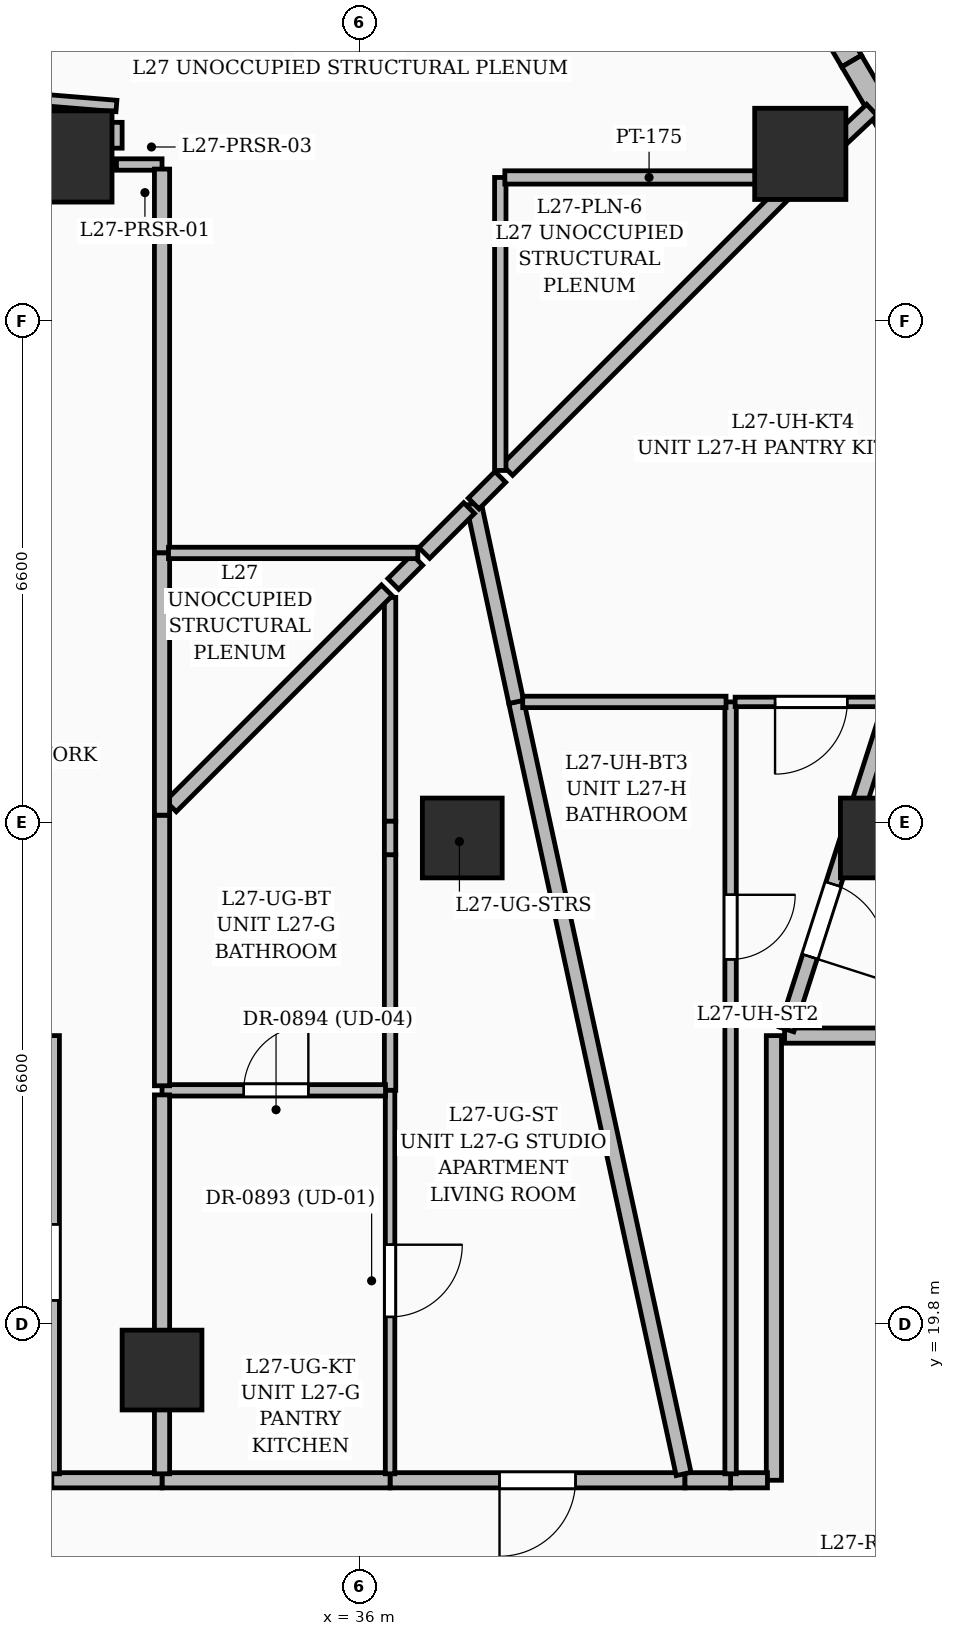
"""IFC4 building model, lengths in metres.
Left out: names, types, materials, properties, quantities, classifications, styles, units other than length and angle.
Written with IfcOpenShell. Run it as: python <this file> out.ifc"""

import sys

from ifc_helpers import new_model, si_unit, direction, frame, frame_2d, origin, origin_2d, place, context, subcontext, project, spatial, rectangle, extrude, element, fill, save


model = new_model("IFC4")
c1 = context("Model", 3, precision=1e-05, world=origin(), true_north=direction((0.0, 1.0)))
c2 = subcontext(c1, "Body", "Model", "MODEL_VIEW")
j1 = project(units=[si_unit("LENGTHUNIT", "METRE"), si_unit("PLANEANGLEUNIT", "RADIAN")], contexts=[c1])
p1 = place(None, origin())
s1 = spatial("IfcSite", under=j1, at=p1, CompositionType="ELEMENT")
p2 = place(p1, origin())
s2 = spatial("IfcBuilding", under=s1, at=p2, CompositionType="ELEMENT")
p3 = place(p2, frame((0.0, 0.0, 110.4)))
s3 = spatial("IfcBuildingStorey", under=s2, at=p3, CompositionType="ELEMENT", Elevation=110.4)
for number, where, z_axis, x_axis in (
    (1, (42.85, 26.2, 0.0), (0.0, 0.0, 1.0), (1.0, 0.0, 0.0)),
    (2, (37.35, 26.2, 0.0), (0.0, 0.0, 1.0), (1.0, 0.0, 0.0)),
    (3, (33.4, 19.2, 0.0), (0.0, 0.0, 1.0), (1.0, 0.0, 0.0)),
):
    element("IfcColumn", number, at=place(p3, frame(where, z_axis=z_axis, x_axis=x_axis)), inside=s3, PredefinedType="COLUMN", context=c2, shape_type="SweptSolid", body=[
        extrude(rectangle(XDim=1.05, YDim=1.05, at=origin_2d()), origin(), (0.0, 0.0, 1.0), 3.6),
    ])
for number, where, z_axis, x_axis in (
    (4, (41.797, 35.2, 0.0), (0.0, 0.0, 1.0), (1.0, 0.0, 0.0)),
    (5, (32.142, 35.166, 0.0), (0.0, 0.0, 1.0), (1.0, 0.0, 0.0)),
):
    element("IfcColumn", number, at=place(p3, frame(where, z_axis=z_axis, x_axis=x_axis)), inside=s3, PredefinedType="COLUMN", context=c2, shape_type="SweptSolid", body=[
        extrude(rectangle(XDim=1.2, YDim=1.2, at=origin_2d()), origin(), (0.0, 0.0, 1.0), 3.6),
    ])
p4 = place(p3, frame((31.513, 36.415, 0.0), z_axis=(0.0, 0.0, 1.0), x_axis=(0.534892719091, 0.844919983823, 0.0)))
e6 = element("IfcWall", 6, at=p4, inside=s3, PredefinedType="SOLIDWALL", context=c2, shape_type="SweptSolid", body=[
    extrude(rectangle(XDim=6.634, YDim=0.3, at=frame_2d((3.317, 0.0))), origin(), (0.0, 0.0, 1.0), 3.35),
])
p5 = place(p4, frame((0.6, 0.0, 0.55)))
e7 = element("IfcOpeningElement", 7, at=p5, cuts=e6, PredefinedType="OPENING", context=c2, shape_type="SweptSolid", body=[
    extrude(rectangle(XDim=1.6, YDim=2.2, at=frame_2d((0.8, 1.1))), frame((0.0, 0.16, 0.0), z_axis=(0.0, -1.0, 0.0), x_axis=(1.0, 0.0, 0.0)), (0.0, 0.0, 1.0), 0.32),
])
p6 = place(p4, frame((3.35, 0.0, 0.55)))
e8 = element("IfcOpeningElement", 8, at=p6, cuts=e6, PredefinedType="OPENING", context=c2, shape_type="SweptSolid", body=[
    extrude(rectangle(XDim=1.6, YDim=2.2, at=frame_2d((0.8, 1.1))), frame((0.0, 0.16, 0.0), z_axis=(0.0, -1.0, 0.0), x_axis=(1.0, 0.0, 0.0)), (0.0, 0.0, 1.0), 0.32),
])
p7 = place(p3, frame((39.443, 41.58, 0.0), z_axis=(0.0, 0.0, 1.0), x_axis=(0.506342397937, -0.862332520581, 0.0)))
e9 = element("IfcWall", 9, at=p7, inside=s3, PredefinedType="SOLIDWALL", context=c2, shape_type="SweptSolid", body=[
    extrude(rectangle(XDim=5.984, YDim=0.3, at=frame_2d((2.992, 0.0))), origin(), (0.0, 0.0, 1.0), 3.35),
])
p8 = place(p7, frame((2.13, 0.0, 0.6)))
e10 = element("IfcOpeningElement", 10, at=p8, cuts=e9, PredefinedType="OPENING", context=c2, shape_type="SweptSolid", body=[
    extrude(rectangle(XDim=2.4, YDim=2.1, at=frame_2d((1.2, 1.05))), frame((0.0, 0.16, 0.0), z_axis=(0.0, -1.0, 0.0), x_axis=(1.0, 0.0, 0.0)), (0.0, 0.0, 1.0), 0.32),
])
p9 = place(p3, frame((42.472, 36.42, 0.0), z_axis=(0.0, 0.0, 1.0), x_axis=(0.506315009763, -0.86234860172, 0.0)))
e11 = element("IfcWall", 11, at=p9, inside=s3, PredefinedType="SOLIDWALL", context=c2, shape_type="SweptSolid", body=[
    extrude(rectangle(XDim=6.553, YDim=0.3, at=frame_2d((3.277, 0.0))), origin(), (0.0, 0.0, 1.0), 3.35),
])
p10 = place(p9, frame((1.725, 0.0, 0.55)))
e12 = element("IfcOpeningElement", 12, at=p10, cuts=e11, PredefinedType="OPENING", context=c2, shape_type="SweptSolid", body=[
    extrude(rectangle(XDim=2.1, YDim=2.4, at=frame_2d((1.05, 1.2))), frame((0.0, 0.16, 0.0), z_axis=(0.0, -1.0, 0.0), x_axis=(1.0, 0.0, 0.0)), (0.0, 0.0, 1.0), 0.32),
])
p11 = place(p3, frame((40.28, 17.75, 0.0), z_axis=(0.0, 0.0, 1.0), x_axis=(-1.0, 0.0, 0.0)))
e13 = element("IfcWall", 13, at=p11, inside=s3, PredefinedType="PARTITIONING", context=c2, shape_type="SweptSolid", body=[
    extrude(rectangle(XDim=3.88, YDim=0.2, at=frame_2d((1.94, 0.0))), origin(), (0.0, 0.0, 1.0), 3.35),
])
p12 = place(p11, frame((1.44, 0.0, 0.0)))
e14 = element("IfcOpeningElement", 14, at=p12, cuts=e13, PredefinedType="OPENING", context=c2, shape_type="SweptSolid", body=[
    extrude(rectangle(XDim=1.0, YDim=2.2, at=frame_2d((0.5, 1.1))), frame((0.0, 0.11, 0.0), z_axis=(0.0, -1.0, 0.0), x_axis=(1.0, 0.0, 0.0)), (0.0, 0.0, 1.0), 0.22),
])
p13 = place(p3, frame((36.4, 17.75, 0.0), z_axis=(0.0, 0.0, 1.0), x_axis=(-1.0, 0.0, 0.0)))
e15 = element("IfcWall", 15, at=p13, inside=s3, PredefinedType="PARTITIONING", context=c2, shape_type="SweptSolid", body=[
    extrude(rectangle(XDim=3.0, YDim=0.2, at=frame_2d((1.5, 0.0))), origin(), (0.0, 0.0, 1.0), 2.436),
])
p14 = place(p3, frame((43.915, 23.6, 0.0), z_axis=(0.0, 0.0, 1.0), x_axis=(-1.0, 0.0, 0.0)))
e16 = element("IfcWall", 16, at=p14, inside=s3, PredefinedType="PARTITIONING", context=c2, shape_type="SweptSolid", body=[
    extrude(rectangle(XDim=2.325, YDim=0.2, at=frame_2d((1.163, 0.0))), origin(), (0.0, 0.0, 1.0), 2.436),
])
p15 = place(p3, frame((33.4, 17.75, 0.0), z_axis=(0.0, 0.0, 1.0), x_axis=(-1.0, 0.0, 0.0)))
e17 = element("IfcWall", 17, at=p15, inside=s3, PredefinedType="PARTITIONING", context=c2, shape_type="SweptSolid", body=[
    extrude(rectangle(XDim=1.45, YDim=0.2, at=frame_2d((0.725, 0.0))), origin(), (0.0, 0.0, 1.0), 3.35),
])
p16 = place(p3, frame((31.95, 17.835, 0.0), z_axis=(0.0, 0.0, 1.0), x_axis=(0.0, 1.0, 0.0)))
e18 = element("IfcWall", 18, at=p16, inside=s3, PredefinedType="PARTITIONING", context=c2, shape_type="SweptSolid", body=[
    extrude(rectangle(XDim=5.765, YDim=0.2, at=frame_2d((2.883, 0.0))), origin(), (0.0, 0.0, 1.0), 2.372),
])
p17 = place(p16, frame((2.281, 0.0, 0.0)))
e19 = element("IfcOpeningElement", 19, at=p17, cuts=e18, PredefinedType="OPENING", context=c2, shape_type="SweptSolid", body=[
    extrude(rectangle(XDim=1.0, YDim=2.2, at=frame_2d((0.5, 1.1))), frame((0.0, 0.11, 0.0), z_axis=(0.0, -1.0, 0.0), x_axis=(1.0, 0.0, 0.0)), (0.0, 0.0, 1.0), 0.22),
])
p18 = place(p3, frame((41.45, 23.6, 0.0), z_axis=(0.0, 0.0, 1.0), x_axis=(0.0, -1.0, 0.0)))
e20 = element("IfcWall", 20, at=p18, inside=s3, PredefinedType="PARTITIONING", context=c2, shape_type="SweptSolid", body=[
    extrude(rectangle(XDim=5.85, YDim=0.2, at=frame_2d((2.925, 0.0))), origin(), (0.0, 0.0, 1.0), 3.35),
])
p19 = place(p3, frame((41.365, 17.75, 0.0), z_axis=(0.0, 0.0, 1.0), x_axis=(-1.0, 0.0, 0.0)))
e21 = element("IfcWall", 21, at=p19, inside=s3, PredefinedType="PARTITIONING", context=c2, shape_type="SweptSolid", body=[
    extrude(rectangle(XDim=0.485, YDim=0.2, at=frame_2d((0.243, 0.0))), origin(), (0.0, 0.0, 1.0), 3.35),
])
p20 = place(p3, frame((40.88, 17.75, 0.0), z_axis=(0.0, 0.0, 1.0), x_axis=(-1.0, 0.0, 0.0)))
e22 = element("IfcWall", 22, at=p20, inside=s3, PredefinedType="PARTITIONING", context=c2, shape_type="SweptSolid", body=[
    extrude(rectangle(XDim=0.6, YDim=0.2, at=frame_2d((0.3, 0.0))), origin(), (0.0, 0.0, 1.0), 3.35),
])
p21 = place(p3, frame((36.4, 25.98, 0.0), z_axis=(0.0, 0.0, 1.0), x_axis=(0.0, -1.0, 0.0)))
e23 = element("IfcWall", 23, at=p21, inside=s3, PredefinedType="PARTITIONING", context=c2, shape_type="SweptSolid", body=[
    extrude(rectangle(XDim=3.1, YDim=0.15, at=frame_2d((1.55, 0.0))), origin(), (0.0, 0.0, 1.0), 2.436),
])
p22 = place(p3, frame((36.4, 29.365, 0.0), z_axis=(0.0, 0.0, 1.0), x_axis=(0.0, -1.0, 0.0)))
e24 = element("IfcWall", 24, at=p22, inside=s3, PredefinedType="PARTITIONING", context=c2, shape_type="SweptSolid", body=[
    extrude(rectangle(XDim=2.945, YDim=0.15, at=frame_2d((1.473, 0.0))), origin(), (0.0, 0.0, 1.0), 2.372),
])
p23 = place(p3, frame((36.4, 22.88, 0.0), z_axis=(0.0, 0.0, 1.0), x_axis=(0.0, -1.0, 0.0)))
e25 = element("IfcWall", 25, at=p23, inside=s3, PredefinedType="PARTITIONING", context=c2, shape_type="SweptSolid", body=[
    extrude(rectangle(XDim=5.045, YDim=0.125, at=frame_2d((2.522, 0.0))), origin(), (0.0, 0.0, 1.0), 3.35),
])
p24 = place(p23, frame((2.031, 0.0, 0.0)))
e26 = element("IfcOpeningElement", 26, at=p24, cuts=e25, PredefinedType="OPENING", context=c2, shape_type="SweptSolid", body=[
    extrude(rectangle(XDim=0.95, YDim=2.2, at=frame_2d((0.475, 1.1))), frame((0.0, 0.072, 0.0), z_axis=(0.0, -1.0, 0.0), x_axis=(1.0, 0.0, 0.0)), (0.0, 0.0, 1.0), 0.145),
])
p25 = place(p3, frame((40.262, 17.833, 0.0), z_axis=(0.0, 0.0, 1.0), x_axis=(-0.211865908249, 0.977298744971, 0.0)))
e27 = element("IfcWall", 27, at=p25, inside=s3, PredefinedType="PARTITIONING", context=c2, shape_type="SweptSolid", body=[
    extrude(rectangle(XDim=10.393, YDim=0.2, at=frame_2d((5.196, 0.0))), origin(), (0.0, 0.0, 1.0), 2.436),
])
p26 = place(p3, frame((38.06, 27.99, 0.0), z_axis=(0.0, 0.0, 1.0), x_axis=(-0.209797646084, 0.977744827497, 0.0)))
e28 = element("IfcWall", 28, at=p26, inside=s3, PredefinedType="PARTITIONING", context=c2, shape_type="SweptSolid", body=[
    extrude(rectangle(XDim=2.669, YDim=0.2, at=frame_2d((1.335, 0.0))), origin(), (0.0, 0.0, 1.0), 2.709),
])
p27 = place(p3, frame((37.44, 30.54, 0.0), z_axis=(0.0, 0.0, 1.0), x_axis=(-0.707106781187, -0.707106781187, 0.0)))
e29 = element("IfcWall", 29, at=p27, inside=s3, PredefinedType="PARTITIONING", context=c2, shape_type="SweptSolid", body=[
    extrude(rectangle(XDim=0.834, YDim=0.2, at=frame_2d((0.417, 0.0))), origin(), (0.0, 0.0, 1.0), 2.709),
])
p28 = place(p3, frame((36.758, 29.858, 0.0), z_axis=(0.0, 0.0, 1.0), x_axis=(-0.707106781187, -0.707106781187, 0.0)))
e30 = element("IfcWall", 30, at=p28, inside=s3, PredefinedType="PARTITIONING", context=c2, shape_type="SweptSolid", body=[
    extrude(rectangle(XDim=0.447, YDim=0.2, at=frame_2d((0.223, 0.0))), origin(), (0.0, 0.0, 1.0), 3.35),
])
p29 = place(p3, frame((33.4, 22.88, 0.0), z_axis=(0.0, 0.0, 1.0), x_axis=(1.0, 0.0, 0.0)))
e31 = element("IfcWall", 31, at=p29, inside=s3, PredefinedType="PARTITIONING", context=c2, shape_type="SweptSolid", body=[
    extrude(rectangle(XDim=2.94, YDim=0.15, at=frame_2d((1.47, 0.0))), origin(), (0.0, 0.0, 1.0), 2.436),
])
p30 = place(p29, frame((1.075, 0.0, 0.0)))
e32 = element("IfcOpeningElement", 32, at=p30, cuts=e31, PredefinedType="OPENING", context=c2, shape_type="SweptSolid", body=[
    extrude(rectangle(XDim=0.85, YDim=2.1, at=frame_2d((0.425, 1.05))), frame((0.0, 0.085, 0.0), z_axis=(0.0, -1.0, 0.0), x_axis=(1.0, 0.0, 0.0)), (0.0, 0.0, 1.0), 0.17),
])
p31 = place(p3, frame((33.4, 26.5, 0.0), z_axis=(0.0, 0.0, 1.0), x_axis=(0.0, -1.0, 0.0)))
e33 = element("IfcWall", 33, at=p31, inside=s3, PredefinedType="PARTITIONING", context=c2, shape_type="SweptSolid", body=[
    extrude(rectangle(XDim=3.56, YDim=0.2, at=frame_2d((1.78, 0.0))), origin(), (0.0, 0.0, 1.0), 2.709),
])
p32 = place(p3, frame((36.358, 29.458, 0.0), z_axis=(0.0, 0.0, 1.0), x_axis=(-0.707137163672, -0.707076397395, 0.0)))
e34 = element("IfcWall", 34, at=p32, inside=s3, PredefinedType="PARTITIONING", context=c2, shape_type="SweptSolid", body=[
    extrude(rectangle(XDim=4.018, YDim=0.2, at=frame_2d((2.009, 0.0))), origin(), (0.0, 0.0, 1.0), 2.372),
])
p33 = place(p3, frame((33.4, 22.82, 0.0), z_axis=(0.0, 0.0, 1.0), x_axis=(0.0, -1.0, 0.0)))
e35 = element("IfcWall", 35, at=p33, inside=s3, PredefinedType="PARTITIONING", context=c2, shape_type="SweptSolid", body=[
    extrude(rectangle(XDim=4.985, YDim=0.2, at=frame_2d((2.493, 0.0))), origin(), (0.0, 0.0, 1.0), 2.436),
])
p34 = place(p3, frame((43.0, 27.99, 0.0), z_axis=(0.0, 0.0, 1.0), x_axis=(-0.305803129518, -0.95209476733, 0.0)))
e36 = element("IfcWall", 36, at=p34, inside=s3, PredefinedType="PARTITIONING", context=c2, shape_type="SweptSolid", body=[
    extrude(rectangle(XDim=4.526, YDim=0.2, at=frame_2d((2.263, 0.0))), origin(), (0.0, 0.0, 1.0), 2.372),
])
p35 = place(p34, frame((2.519, 0.0, 0.0)))
e37 = element("IfcOpeningElement", 37, at=p35, cuts=e36, PredefinedType="OPENING", context=c2, shape_type="SweptSolid", body=[
    extrude(rectangle(XDim=1.0, YDim=2.2, at=frame_2d((0.5, 1.1))), frame((0.0, 0.11, 0.0), z_axis=(0.0, -1.0, 0.0), x_axis=(1.0, 0.0, 0.0)), (0.0, 0.0, 1.0), 0.22),
])
p36 = place(p3, frame((33.4, 35.06, 0.0), z_axis=(0.0, 0.0, 1.0), x_axis=(-1.0, 0.0, 0.0)))
e38 = element("IfcWall", 38, at=p36, inside=s3, PredefinedType="PARTITIONING", context=c2, shape_type="SweptSolid", body=[
    extrude(rectangle(XDim=0.6, YDim=0.15, at=frame_2d((0.3, 0.0))), origin(), (0.0, 0.0, 1.0), 2.57),
])
p37 = place(p3, frame((33.4, 29.95, 0.0), z_axis=(0.0, 0.0, 1.0), x_axis=(0.0, 1.0, 0.0)))
e39 = element("IfcWall", 39, at=p37, inside=s3, PredefinedType="PARTITIONING", context=c2, shape_type="SweptSolid", body=[
    extrude(rectangle(XDim=5.05, YDim=0.2, at=frame_2d((2.525, 0.0))), origin(), (0.0, 0.0, 1.0), 2.372),
])
p38 = place(p3, frame((33.4, 26.5, 0.0), z_axis=(0.0, 0.0, 1.0), x_axis=(0.0, 1.0, 0.0)))
e40 = element("IfcWall", 40, at=p38, inside=s3, PredefinedType="PARTITIONING", context=c2, shape_type="SweptSolid", body=[
    extrude(rectangle(XDim=3.45, YDim=0.2, at=frame_2d((1.725, 0.0))), origin(), (0.0, 0.0, 1.0), 2.709),
])
p39 = place(p3, frame((40.88, 27.99, 0.0), z_axis=(0.0, 0.0, 1.0), x_axis=(0.0, -1.0, 0.0)))
e41 = element("IfcWall", 41, at=p39, inside=s3, PredefinedType="PARTITIONING", context=c2, shape_type="SweptSolid", body=[
    extrude(rectangle(XDim=10.155, YDim=0.15, at=frame_2d((5.078, 0.0))), origin(), (0.0, 0.0, 1.0), 2.436),
])
p40 = place(p39, frame((2.537, 0.0, 0.0)))
e42 = element("IfcOpeningElement", 42, at=p40, cuts=e41, PredefinedType="OPENING", context=c2, shape_type="SweptSolid", body=[
    extrude(rectangle(XDim=0.85, YDim=2.1, at=frame_2d((0.425, 1.05))), frame((0.0, 0.085, 0.0), z_axis=(0.0, -1.0, 0.0), x_axis=(1.0, 0.0, 0.0)), (0.0, 0.0, 1.0), 0.17),
])
p41 = place(p3, frame((42.915, 27.99, 0.0), z_axis=(0.0, 0.0, 1.0), x_axis=(-1.0, 0.0, 0.0)))
e43 = element("IfcWall", 43, at=p41, inside=s3, PredefinedType="PARTITIONING", context=c2, shape_type="SweptSolid", body=[
    extrude(rectangle(XDim=1.975, YDim=0.125, at=frame_2d((0.988, 0.0))), origin(), (0.0, 0.0, 1.0), 2.372),
])
p42 = place(p41, frame((0.5, 0.0, 0.0)))
e44 = element("IfcOpeningElement", 44, at=p42, cuts=e43, PredefinedType="OPENING", context=c2, shape_type="SweptSolid", body=[
    extrude(rectangle(XDim=0.95, YDim=2.2, at=frame_2d((0.475, 1.1))), frame((0.0, 0.072, 0.0), z_axis=(0.0, -1.0, 0.0), x_axis=(1.0, 0.0, 0.0)), (0.0, 0.0, 1.0), 0.145),
])
p43 = place(p3, frame((40.82, 27.99, 0.0), z_axis=(0.0, 0.0, 1.0), x_axis=(-1.0, 0.0, 0.0)))
e45 = element("IfcWall", 45, at=p43, inside=s3, PredefinedType="PARTITIONING", context=c2, shape_type="SweptSolid", body=[
    extrude(rectangle(XDim=2.675, YDim=0.15, at=frame_2d((1.337, 0.0))), origin(), (0.0, 0.0, 1.0), 3.35),
])
p44 = place(p3, frame((37.85, 30.95, 0.0), z_axis=(0.0, 0.0, 1.0), x_axis=(-0.707353374636, -0.706860101711, 0.0)))
e46 = element("IfcWall", 46, at=p44, inside=s3, PredefinedType="PARTITIONING", context=c2, shape_type="SweptSolid", body=[
    extrude(rectangle(XDim=0.495, YDim=0.2, at=frame_2d((0.248, 0.0))), origin(), (0.0, 0.0, 1.0), 2.709),
])
p45 = place(p3, frame((42.738, 35.779, 0.0), z_axis=(0.0, 0.0, 1.0), x_axis=(-0.729379024936, -0.684109814272, 0.0)))
e47 = element("IfcWall", 47, at=p45, inside=s3, PredefinedType="PARTITIONING", context=c2, shape_type="SweptSolid", body=[
    extrude(rectangle(XDim=1.3, YDim=0.2, at=frame_2d((0.65, 0.0))), origin(), (0.0, 0.0, 1.0), 3.35),
])
p46 = place(p3, frame((41.684, 34.784, 0.0), z_axis=(0.0, 0.0, 1.0), x_axis=(-0.707106781187, -0.707106781187, 0.0)))
e48 = element("IfcWall", 48, at=p46, inside=s3, PredefinedType="PARTITIONING", context=c2, shape_type="SweptSolid", body=[
    extrude(rectangle(XDim=5.292, YDim=0.2, at=frame_2d((2.646, 0.0))), origin(), (0.0, 0.0, 1.0), 2.709),
])
p47 = place(p3, frame((33.485, 29.95, 0.0), z_axis=(0.0, 0.0, 1.0), x_axis=(1.0, 0.0, 0.0)))
e49 = element("IfcWall", 49, at=p47, inside=s3, PredefinedType="PARTITIONING", context=c2, shape_type="SweptSolid", body=[
    extrude(rectangle(XDim=3.28, YDim=0.15, at=frame_2d((1.64, 0.0))), origin(), (0.0, 0.0, 1.0), 2.372),
])
p48 = place(p3, frame((37.85, 31.035, 0.0), z_axis=(0.0, 0.0, 1.0), x_axis=(0.0, 1.0, 0.0)))
e50 = element("IfcWall", 50, at=p48, inside=s3, PredefinedType="PARTITIONING", context=c2, shape_type="SweptSolid", body=[
    extrude(rectangle(XDim=3.855, YDim=0.15, at=frame_2d((1.927, 0.0))), origin(), (0.0, 0.0, 1.0), 2.709),
])
p49 = place(p3, frame((37.91, 34.89, 0.0), z_axis=(0.0, 0.0, 1.0), x_axis=(1.0, 0.0, 0.0)))
e51 = element("IfcWall", 51, at=p49, inside=s3, PredefinedType="PARTITIONING", context=c2, shape_type="SweptSolid", body=[
    extrude(rectangle(XDim=3.795, YDim=0.175, at=frame_2d((1.897, 0.0))), origin(), (0.0, 0.0, 1.0), 2.57),
])
p50 = place(p3, frame((36.4, 25.98, 0.0), z_axis=(0.0, 0.0, 1.0), x_axis=(0.0, 1.0, 0.0)))
e52 = element("IfcWall", 52, at=p50, inside=s3, PredefinedType="PARTITIONING", context=c2, shape_type="SweptSolid", body=[
    extrude(rectangle(XDim=0.44, YDim=0.15, at=frame_2d((0.22, 0.0))), origin(), (0.0, 0.0, 1.0), 3.35),
])
p51 = place(p3, frame((31.347, 35.949, 0.0), z_axis=(0.0, 0.0, 1.0), x_axis=(0.996669356606, -0.081548719198, 0.0)))
e53 = element("IfcWall", 53, at=p51, inside=s3, PredefinedType="PARTITIONING", context=c2, shape_type="SweptSolid", body=[
    extrude(rectangle(XDim=1.458, YDim=0.15, at=frame_2d((0.729, 0.0))), origin(), (0.0, 0.0, 1.0), 3.35),
])
p52 = place(p3, frame((32.8, 35.615, 0.0), z_axis=(0.0, 0.0, 1.0), x_axis=(0.0, -1.0, 0.0)))
e54 = element("IfcWall", 54, at=p52, inside=s3, PredefinedType="PARTITIONING", context=c2, shape_type="SweptSolid", body=[
    extrude(rectangle(XDim=0.34, YDim=0.15, at=frame_2d((0.17, 0.0))), origin(), (0.0, 0.0, 1.0), 2.57),
])
p53 = place(p12, origin())
e55 = element("IfcDoor", 55, at=p53, inside=s3, OperationType="SINGLE_SWING_RIGHT", PredefinedType="DOOR", context=c2, shape_type="SweptSolid", body=[
    extrude(rectangle(XDim=1.0, YDim=2.2, at=frame_2d((0.5, 1.1))), frame((0.0, 0.025, 0.0), z_axis=(0.0, -1.0, 0.0), x_axis=(1.0, 0.0, 0.0)), (0.0, 0.0, 1.0), 0.05),
])
fill(e14, e55)
p54 = place(p24, origin())
e56 = element("IfcDoor", 56, at=p54, inside=s3, OperationType="SINGLE_SWING_LEFT", PredefinedType="DOOR", context=c2, shape_type="SweptSolid", body=[
    extrude(rectangle(XDim=0.95, YDim=2.2, at=frame_2d((0.475, 1.1))), frame((0.0, 0.025, 0.0), z_axis=(0.0, -1.0, 0.0), x_axis=(1.0, 0.0, 0.0)), (0.0, 0.0, 1.0), 0.05),
])
fill(e26, e56)
p55 = place(p30, origin())
e57 = element("IfcDoor", 57, at=p55, inside=s3, OperationType="SINGLE_SWING_RIGHT", PredefinedType="DOOR", context=c2, shape_type="SweptSolid", body=[
    extrude(rectangle(XDim=0.85, YDim=2.1, at=frame_2d((0.425, 1.05))), frame((0.0, 0.025, 0.0), z_axis=(0.0, -1.0, 0.0), x_axis=(1.0, 0.0, 0.0)), (0.0, 0.0, 1.0), 0.05),
])
fill(e32, e57)
p56 = place(p17, origin())
e58 = element("IfcDoor", 58, at=p56, inside=s3, OperationType="SINGLE_SWING_LEFT", PredefinedType="DOOR", context=c2, shape_type="SweptSolid", body=[
    extrude(rectangle(XDim=1.0, YDim=2.2, at=frame_2d((0.5, 1.1))), frame((0.0, 0.025, 0.0), z_axis=(0.0, -1.0, 0.0), x_axis=(1.0, 0.0, 0.0)), (0.0, 0.0, 1.0), 0.05),
])
fill(e19, e58)
p57 = place(p42, origin())
e59 = element("IfcDoor", 59, at=p57, inside=s3, OperationType="SINGLE_SWING_RIGHT", PredefinedType="DOOR", context=c2, shape_type="SweptSolid", body=[
    extrude(rectangle(XDim=0.95, YDim=2.2, at=frame_2d((0.475, 1.1))), frame((0.0, 0.025, 0.0), z_axis=(0.0, -1.0, 0.0), x_axis=(1.0, 0.0, 0.0)), (0.0, 0.0, 1.0), 0.05),
])
fill(e44, e59)
p58 = place(p40, origin())
e60 = element("IfcDoor", 60, at=p58, inside=s3, OperationType="SINGLE_SWING_LEFT", PredefinedType="DOOR", context=c2, shape_type="SweptSolid", body=[
    extrude(rectangle(XDim=0.85, YDim=2.1, at=frame_2d((0.425, 1.05))), frame((0.0, 0.025, 0.0), z_axis=(0.0, -1.0, 0.0), x_axis=(1.0, 0.0, 0.0)), (0.0, 0.0, 1.0), 0.05),
])
fill(e42, e60)
p59 = place(p35, origin())
e61 = element("IfcDoor", 61, at=p59, inside=s3, OperationType="SINGLE_SWING_RIGHT", PredefinedType="DOOR", context=c2, shape_type="SweptSolid", body=[
    extrude(rectangle(XDim=1.0, YDim=2.2, at=frame_2d((0.5, 1.1))), frame((0.0, 0.025, 0.0), z_axis=(0.0, -1.0, 0.0), x_axis=(1.0, 0.0, 0.0)), (0.0, 0.0, 1.0), 0.05),
])
fill(e37, e61)
save(model, sys.argv[1])
